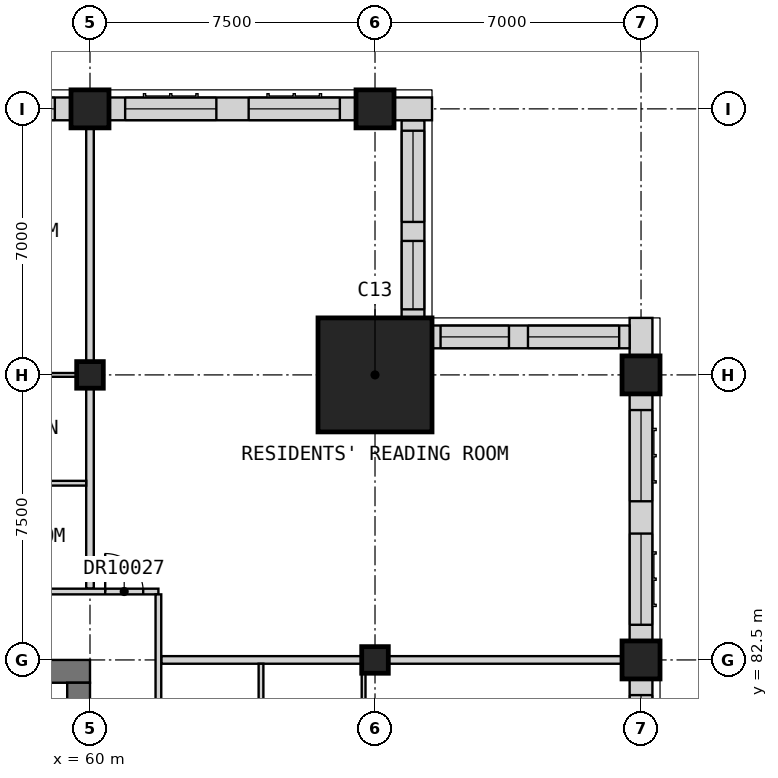
"""IFC4 building model, lengths in metres.
Left out: names, types, materials, properties, quantities, classifications, styles, units other than length and angle.
Written with IfcOpenShell. Run it as: python <this file> out.ifc"""

import sys

from ifc_helpers import new_model, si_unit, direction, frame, frame_2d, origin, origin_2d, place, context, subcontext, project, spatial, rectangle, extrude, element, fill, save


model = new_model("IFC4")
c1 = context("Model", 3, precision=1e-05, world=origin(), true_north=direction((0.0, 1.0)))
c2 = subcontext(c1, "Body", "Model", "MODEL_VIEW")
j1 = project(units=[si_unit("LENGTHUNIT", "METRE"), si_unit("PLANEANGLEUNIT", "RADIAN")], contexts=[c1])
p1 = place(None, origin())
s1 = spatial("IfcSite", under=j1, at=p1, CompositionType="ELEMENT")
p2 = place(p1, origin())
s2 = spatial("IfcBuilding", under=s1, at=p2, CompositionType="ELEMENT")
p3 = place(p2, frame((0.0, 0.0, 283.7)))
s3 = spatial("IfcBuildingStorey", under=s2, at=p3, CompositionType="ELEMENT", Elevation=283.7)
p4 = place(p3, frame((60.0, 90.0, 0.0), z_axis=(0.0, 0.0, 1.0), x_axis=(1.0, 0.0, 0.0)))
e1 = element("IfcColumn", 1, at=p4, inside=s3, PredefinedType="COLUMN", context=c2, shape_type="SweptSolid", body=[
    extrude(rectangle(XDim=0.7, YDim=0.7, at=origin_2d()), origin(), (0.0, 0.0, 1.0), 3.5),
])
p5 = place(p3, frame((60.0, 97.0, 0.0), z_axis=(0.0, 0.0, 1.0), x_axis=(1.0, 0.0, 0.0)))
e2 = element("IfcColumn", 2, at=p5, inside=s3, PredefinedType="COLUMN", context=c2, shape_type="SweptSolid", body=[
    extrude(rectangle(XDim=1.0, YDim=1.0, at=origin_2d()), origin(), (0.0, 0.0, 1.0), 3.5),
])
p6 = place(p3, frame((67.5, 82.5, 0.0), z_axis=(0.0, 0.0, 1.0), x_axis=(1.0, 0.0, 0.0)))
e3 = element("IfcColumn", 3, at=p6, inside=s3, PredefinedType="COLUMN", context=c2, shape_type="SweptSolid", body=[
    extrude(rectangle(XDim=0.7, YDim=0.7, at=origin_2d()), origin(), (0.0, 0.0, 1.0), 3.5),
])
for number, where, z_axis, x_axis in (
    (4, (67.5, 97.0, 0.0), (0.0, 0.0, 1.0), (1.0, 0.0, 0.0)),
    (5, (74.5, 82.5, 0.0), (0.0, 0.0, 1.0), (1.0, 0.0, 0.0)),
    (6, (74.5, 90.0, 0.0), (0.0, 0.0, 1.0), (1.0, 0.0, 0.0)),
):
    element("IfcColumn", number, at=place(p3, frame(where, z_axis=z_axis, x_axis=x_axis)), inside=s3, PredefinedType="COLUMN", context=c2, shape_type="SweptSolid", body=[
        extrude(rectangle(XDim=1.0, YDim=1.0, at=origin_2d()), origin(), (0.0, 0.0, 1.0), 3.5),
    ])
p7 = place(p3, frame((67.5, 90.0, 0.0), z_axis=(0.0, 0.0, 1.0), x_axis=(1.0, 0.0, 0.0)))
e7 = element("IfcColumn", 7, at=p7, inside=s3, PredefinedType="COLUMN", context=c2, shape_type="SweptSolid", body=[
    extrude(rectangle(XDim=3.0, YDim=3.0, at=origin_2d()), origin(), (0.0, 0.0, 1.0), 3.5),
])
p8 = place(p3, frame((30.0, 82.2, 0.0), z_axis=(0.0, 0.0, 1.0), x_axis=(1.0, 0.0, 0.0)))
e8 = element("IfcWall", 8, at=p8, inside=s3, PredefinedType="SHEAR", context=c2, shape_type="SweptSolid", body=[
    extrude(rectangle(XDim=30.0, YDim=0.6, at=frame_2d((15.0, 0.0))), origin(), (0.0, 0.0, 1.0), 3.5),
])
p9 = place(p3, frame((59.7, 60.6, 0.0), z_axis=(0.0, 0.0, 1.0), x_axis=(0.0, 1.0, 0.0)))
e9 = element("IfcWall", 9, at=p9, inside=s3, PredefinedType="SHEAR", context=c2, shape_type="SweptSolid", body=[
    extrude(rectangle(XDim=21.3, YDim=0.6, at=frame_2d((10.65, 0.0))), origin(), (0.0, 0.0, 1.0), 3.5),
])
p10 = place(p9, frame((14.9, 0.0, 0.0)))
e10 = element("IfcOpeningElement", 10, at=p10, cuts=e9, PredefinedType="OPENING", context=c2, shape_type="SweptSolid", body=[
    extrude(rectangle(XDim=1.8, YDim=2.1, at=frame_2d((0.9, 1.05))), frame((0.0, 0.31, 0.0), z_axis=(0.0, -1.0, 0.0), x_axis=(1.0, 0.0, 0.0)), (0.0, 0.0, 1.0), 0.62),
])
p11 = place(p3, frame((74.5, 75.5, 0.0), z_axis=(0.0, 0.0, 1.0), x_axis=(0.0, 1.0, 0.0)))
e11 = element("IfcWall", 11, at=p11, inside=s3, PredefinedType="SOLIDWALL", context=c2, shape_type="SweptSolid", body=[
    extrude(rectangle(XDim=6.5, YDim=0.6, at=frame_2d((3.25, 0.0))), origin(), (0.0, 0.0, 1.0), 2.75),
])
p12 = place(p11, frame((0.425, 0.0, 0.8)))
e12 = element("IfcOpeningElement", 12, at=p12, cuts=e11, PredefinedType="OPENING", context=c2, shape_type="SweptSolid", body=[
    extrude(rectangle(XDim=2.4, YDim=1.8, at=frame_2d((1.2, 0.9))), frame((0.0, 0.31, 0.0), z_axis=(0.0, -1.0, 0.0), x_axis=(1.0, 0.0, 0.0)), (0.0, 0.0, 1.0), 0.62),
])
p13 = place(p11, frame((3.675, 0.0, 0.8)))
e13 = element("IfcOpeningElement", 13, at=p13, cuts=e11, PredefinedType="OPENING", context=c2, shape_type="SweptSolid", body=[
    extrude(rectangle(XDim=2.4, YDim=1.8, at=frame_2d((1.2, 0.9))), frame((0.0, 0.31, 0.0), z_axis=(0.0, -1.0, 0.0), x_axis=(1.0, 0.0, 0.0)), (0.0, 0.0, 1.0), 0.62),
])
p14 = place(p3, frame((74.5, 83.0, 0.0), z_axis=(0.0, 0.0, 1.0), x_axis=(0.0, 1.0, 0.0)))
e14 = element("IfcWall", 14, at=p14, inside=s3, PredefinedType="SOLIDWALL", context=c2, shape_type="SweptSolid", body=[
    extrude(rectangle(XDim=6.5, YDim=0.6, at=frame_2d((3.25, 0.0))), origin(), (0.0, 0.0, 1.0), 2.75),
])
p15 = place(p14, frame((0.425, 0.0, 0.8)))
e15 = element("IfcOpeningElement", 15, at=p15, cuts=e14, PredefinedType="OPENING", context=c2, shape_type="SweptSolid", body=[
    extrude(rectangle(XDim=2.4, YDim=1.8, at=frame_2d((1.2, 0.9))), frame((0.0, 0.31, 0.0), z_axis=(0.0, -1.0, 0.0), x_axis=(1.0, 0.0, 0.0)), (0.0, 0.0, 1.0), 0.62),
])
p16 = place(p14, frame((3.675, 0.0, 0.8)))
e16 = element("IfcOpeningElement", 16, at=p16, cuts=e14, PredefinedType="OPENING", context=c2, shape_type="SweptSolid", body=[
    extrude(rectangle(XDim=2.4, YDim=1.8, at=frame_2d((1.2, 0.9))), frame((0.0, 0.31, 0.0), z_axis=(0.0, -1.0, 0.0), x_axis=(1.0, 0.0, 0.0)), (0.0, 0.0, 1.0), 0.62),
])
p17 = place(p3, frame((74.5, 90.5, 0.0), z_axis=(0.0, 0.0, 1.0), x_axis=(0.0, 1.0, 0.0)))
e17 = element("IfcWall", 17, at=p17, inside=s3, PredefinedType="SOLIDWALL", context=c2, shape_type="SweptSolid", body=[
    extrude(rectangle(XDim=1.0, YDim=0.6, at=frame_2d((0.5, 0.0))), origin(), (0.0, 0.0, 1.0), 3.2),
])
p18 = place(p3, frame((74.2, 91.0, 0.0), z_axis=(0.0, 0.0, 1.0), x_axis=(-1.0, 0.0, 0.0)))
e18 = element("IfcWall", 18, at=p18, inside=s3, PredefinedType="SOLIDWALL", context=c2, shape_type="SweptSolid", body=[
    extrude(rectangle(XDim=5.2, YDim=0.6, at=frame_2d((2.6, 0.0))), origin(), (0.0, 0.0, 1.0), 3.2),
])
p19 = place(p18, frame((3.175, 0.0, 0.8)))
e19 = element("IfcOpeningElement", 19, at=p19, cuts=e18, PredefinedType="OPENING", context=c2, shape_type="SweptSolid", body=[
    extrude(rectangle(XDim=1.8, YDim=1.8, at=frame_2d((0.9, 0.9))), frame((0.0, 0.31, 0.0), z_axis=(0.0, -1.0, 0.0), x_axis=(1.0, 0.0, 0.0)), (0.0, 0.0, 1.0), 0.62),
])
p20 = place(p18, frame((0.275, 0.0, 0.8)))
e20 = element("IfcOpeningElement", 20, at=p20, cuts=e18, PredefinedType="OPENING", context=c2, shape_type="SweptSolid", body=[
    extrude(rectangle(XDim=2.4, YDim=1.8, at=frame_2d((1.2, 0.9))), frame((0.0, 0.31, 0.0), z_axis=(0.0, -1.0, 0.0), x_axis=(1.0, 0.0, 0.0)), (0.0, 0.0, 1.0), 0.62),
])
p21 = place(p3, frame((68.5, 91.5, 0.0), z_axis=(0.0, 0.0, 1.0), x_axis=(0.0, 1.0, 0.0)))
e21 = element("IfcWall", 21, at=p21, inside=s3, PredefinedType="SOLIDWALL", context=c2, shape_type="SweptSolid", body=[
    extrude(rectangle(XDim=5.2, YDim=0.6, at=frame_2d((2.6, 0.0))), origin(), (0.0, 0.0, 1.0), 3.2),
])
p22 = place(p21, frame((0.225, 0.0, 0.8)))
e22 = element("IfcOpeningElement", 22, at=p22, cuts=e21, PredefinedType="OPENING", context=c2, shape_type="SweptSolid", body=[
    extrude(rectangle(XDim=1.8, YDim=1.8, at=frame_2d((0.9, 0.9))), frame((0.0, 0.31, 0.0), z_axis=(0.0, -1.0, 0.0), x_axis=(1.0, 0.0, 0.0)), (0.0, 0.0, 1.0), 0.62),
])
p23 = place(p21, frame((2.525, 0.0, 0.8)))
e23 = element("IfcOpeningElement", 23, at=p23, cuts=e21, PredefinedType="OPENING", context=c2, shape_type="SweptSolid", body=[
    extrude(rectangle(XDim=2.4, YDim=1.8, at=frame_2d((1.2, 0.9))), frame((0.0, 0.31, 0.0), z_axis=(0.0, -1.0, 0.0), x_axis=(1.0, 0.0, 0.0)), (0.0, 0.0, 1.0), 0.62),
])
p24 = place(p3, frame((69.0, 97.0, 0.0), z_axis=(0.0, 0.0, 1.0), x_axis=(-1.0, 0.0, 0.0)))
e24 = element("IfcWall", 24, at=p24, inside=s3, PredefinedType="SOLIDWALL", context=c2, shape_type="SweptSolid", body=[
    extrude(rectangle(XDim=1.0, YDim=0.6, at=frame_2d((0.5, 0.0))), origin(), (0.0, 0.0, 1.0), 3.2),
])
p25 = place(p3, frame((67.0, 97.0, 0.0), z_axis=(0.0, 0.0, 1.0), x_axis=(-1.0, 0.0, 0.0)))
e25 = element("IfcWall", 25, at=p25, inside=s3, PredefinedType="SOLIDWALL", context=c2, shape_type="SweptSolid", body=[
    extrude(rectangle(XDim=6.5, YDim=0.6, at=frame_2d((3.25, 0.0))), origin(), (0.0, 0.0, 1.0), 2.75),
])
p26 = place(p25, frame((3.675, 0.0, 0.8)))
e26 = element("IfcOpeningElement", 26, at=p26, cuts=e25, PredefinedType="OPENING", context=c2, shape_type="SweptSolid", body=[
    extrude(rectangle(XDim=2.4, YDim=1.8, at=frame_2d((1.2, 0.9))), frame((0.0, 0.31, 0.0), z_axis=(0.0, -1.0, 0.0), x_axis=(1.0, 0.0, 0.0)), (0.0, 0.0, 1.0), 0.62),
])
p27 = place(p25, frame((0.425, 0.0, 0.8)))
e27 = element("IfcOpeningElement", 27, at=p27, cuts=e25, PredefinedType="OPENING", context=c2, shape_type="SweptSolid", body=[
    extrude(rectangle(XDim=2.4, YDim=1.8, at=frame_2d((1.2, 0.9))), frame((0.0, 0.31, 0.0), z_axis=(0.0, -1.0, 0.0), x_axis=(1.0, 0.0, 0.0)), (0.0, 0.0, 1.0), 0.62),
])
p28 = place(p3, frame((59.5, 97.0, 0.0), z_axis=(0.0, 0.0, 1.0), x_axis=(-1.0, 0.0, 0.0)))
e28 = element("IfcWall", 28, at=p28, inside=s3, PredefinedType="SOLIDWALL", context=c2, shape_type="SweptSolid", body=[
    extrude(rectangle(XDim=6.5, YDim=0.6, at=frame_2d((3.25, 0.0))), origin(), (0.0, 0.0, 1.0), 2.75),
])
p29 = place(p28, frame((3.675, 0.0, 0.8)))
e29 = element("IfcOpeningElement", 29, at=p29, cuts=e28, PredefinedType="OPENING", context=c2, shape_type="SweptSolid", body=[
    extrude(rectangle(XDim=2.4, YDim=1.8, at=frame_2d((1.2, 0.9))), frame((0.0, 0.31, 0.0), z_axis=(0.0, -1.0, 0.0), x_axis=(1.0, 0.0, 0.0)), (0.0, 0.0, 1.0), 0.62),
])
p30 = place(p28, frame((0.425, 0.0, 0.8)))
e30 = element("IfcOpeningElement", 30, at=p30, cuts=e28, PredefinedType="OPENING", context=c2, shape_type="SweptSolid", body=[
    extrude(rectangle(XDim=2.4, YDim=1.8, at=frame_2d((1.2, 0.9))), frame((0.0, 0.31, 0.0), z_axis=(0.0, -1.0, 0.0), x_axis=(1.0, 0.0, 0.0)), (0.0, 0.0, 1.0), 0.62),
])
for number, where, z_axis, x_axis in (
    (31, (61.875, 82.5, 0.0), (0.0, 0.0, 1.0), (1.0, 0.0, 0.0)),
    (32, (60.0, 84.375, 0.0), (0.0, 0.0, 1.0), (0.0, 1.0, 0.0)),
):
    element("IfcWall", number, at=place(p3, frame(where, z_axis=z_axis, x_axis=x_axis)), inside=s3, PredefinedType="PARTITIONING", context=c2, shape_type="SweptSolid", body=[
        extrude(rectangle(XDim=13.125, YDim=0.2, at=frame_2d((6.562, 0.0))), origin(), (0.0, 0.0, 1.0), 3.2),
    ])
p31 = place(p3, frame((33.75, 84.3, 0.0), z_axis=(0.0, 0.0, 1.0), x_axis=(1.0, 0.0, 0.0)))
e33 = element("IfcWall", 33, at=p31, inside=s3, PredefinedType="PARTITIONING", context=c2, shape_type="SweptSolid", body=[
    extrude(rectangle(XDim=28.05, YDim=0.15, at=frame_2d((14.025, 0.0))), origin(), (0.0, 0.0, 1.0), 3.2),
])
p32 = place(p31, frame((5.125, 0.0, 0.0)))
e34 = element("IfcOpeningElement", 34, at=p32, cuts=e33, PredefinedType="OPENING", context=c2, shape_type="SweptSolid", body=[
    extrude(rectangle(XDim=1.0, YDim=2.1, at=frame_2d((0.5, 1.05))), frame((0.0, 0.085, 0.0), z_axis=(0.0, -1.0, 0.0), x_axis=(1.0, 0.0, 0.0)), (0.0, 0.0, 1.0), 0.17),
])
p33 = place(p31, frame((12.675, 0.0, 0.0)))
e35 = element("IfcOpeningElement", 35, at=p33, cuts=e33, PredefinedType="OPENING", context=c2, shape_type="SweptSolid", body=[
    extrude(rectangle(XDim=0.9, YDim=2.1, at=frame_2d((0.45, 1.05))), frame((0.0, 0.085, 0.0), z_axis=(0.0, -1.0, 0.0), x_axis=(1.0, 0.0, 0.0)), (0.0, 0.0, 1.0), 0.17),
])
p34 = place(p31, frame((20.175, 0.0, 0.0)))
e36 = element("IfcOpeningElement", 36, at=p34, cuts=e33, PredefinedType="OPENING", context=c2, shape_type="SweptSolid", body=[
    extrude(rectangle(XDim=0.9, YDim=2.1, at=frame_2d((0.45, 1.05))), frame((0.0, 0.085, 0.0), z_axis=(0.0, -1.0, 0.0), x_axis=(1.0, 0.0, 0.0)), (0.0, 0.0, 1.0), 0.17),
])
p35 = place(p31, frame((26.65, 0.0, 0.0)))
e37 = element("IfcOpeningElement", 37, at=p35, cuts=e33, PredefinedType="OPENING", context=c2, shape_type="SweptSolid", body=[
    extrude(rectangle(XDim=1.0, YDim=2.1, at=frame_2d((0.5, 1.05))), frame((0.0, 0.085, 0.0), z_axis=(0.0, -1.0, 0.0), x_axis=(1.0, 0.0, 0.0)), (0.0, 0.0, 1.0), 0.17),
])
p36 = place(p3, frame((61.8, 58.275, 0.0), z_axis=(0.0, 0.0, 1.0), x_axis=(0.0, 1.0, 0.0)))
e38 = element("IfcWall", 38, at=p36, inside=s3, PredefinedType="PARTITIONING", context=c2, shape_type="SweptSolid", body=[
    extrude(rectangle(XDim=25.95, YDim=0.15, at=frame_2d((12.975, 0.0))), origin(), (0.0, 0.0, 1.0), 3.2),
])
p37 = place(p36, frame((6.9, 0.0, 0.0)))
e39 = element("IfcOpeningElement", 39, at=p37, cuts=e38, PredefinedType="OPENING", context=c2, shape_type="SweptSolid", body=[
    extrude(rectangle(XDim=0.9, YDim=2.1, at=frame_2d((0.45, 1.05))), frame((0.0, 0.085, 0.0), z_axis=(0.0, -1.0, 0.0), x_axis=(1.0, 0.0, 0.0)), (0.0, 0.0, 1.0), 0.17),
])
p38 = place(p36, frame((18.15, 0.0, 0.0)))
e40 = element("IfcOpeningElement", 40, at=p38, cuts=e38, PredefinedType="OPENING", context=c2, shape_type="SweptSolid", body=[
    extrude(rectangle(XDim=0.9, YDim=2.1, at=frame_2d((0.45, 1.05))), frame((0.0, 0.085, 0.0), z_axis=(0.0, -1.0, 0.0), x_axis=(1.0, 0.0, 0.0)), (0.0, 0.0, 1.0), 0.17),
])
p39 = place(p3, frame((45.1, 90.0, 0.0), z_axis=(0.0, 0.0, 1.0), x_axis=(1.0, 0.0, 0.0)))
e41 = element("IfcWall", 41, at=p39, inside=s3, PredefinedType="PARTITIONING", context=c2, shape_type="SweptSolid", body=[
    extrude(rectangle(XDim=14.8, YDim=0.1, at=frame_2d((7.4, 0.0))), origin(), (0.0, 0.0, 1.0), 3.2),
])
p40 = place(p39, frame((1.325, 0.0, 0.0)))
e42 = element("IfcOpeningElement", 42, at=p40, cuts=e41, PredefinedType="OPENING", context=c2, shape_type="SweptSolid", body=[
    extrude(rectangle(XDim=0.9, YDim=2.1, at=frame_2d((0.45, 1.05))), frame((0.0, 0.06, 0.0), z_axis=(0.0, -1.0, 0.0), x_axis=(1.0, 0.0, 0.0)), (0.0, 0.0, 1.0), 0.12),
])
p41 = place(p39, frame((8.825, 0.0, 0.0)))
e43 = element("IfcOpeningElement", 43, at=p41, cuts=e41, PredefinedType="OPENING", context=c2, shape_type="SweptSolid", body=[
    extrude(rectangle(XDim=0.9, YDim=2.1, at=frame_2d((0.45, 1.05))), frame((0.0, 0.06, 0.0), z_axis=(0.0, -1.0, 0.0), x_axis=(1.0, 0.0, 0.0)), (0.0, 0.0, 1.0), 0.12),
])
p42 = place(p3, frame((67.2, 60.1, 0.0), z_axis=(0.0, 0.0, 1.0), x_axis=(0.0, 1.0, 0.0)))
e44 = element("IfcWall", 44, at=p42, inside=s3, PredefinedType="PARTITIONING", context=c2, shape_type="SweptSolid", body=[
    extrude(rectangle(XDim=22.3, YDim=0.1, at=frame_2d((11.15, 0.0))), origin(), (0.0, 0.0, 1.0), 3.2),
])
p43 = place(p42, frame((1.325, 0.0, 0.0)))
e45 = element("IfcOpeningElement", 45, at=p43, cuts=e44, PredefinedType="OPENING", context=c2, shape_type="SweptSolid", body=[
    extrude(rectangle(XDim=0.9, YDim=2.1, at=frame_2d((0.45, 1.05))), frame((0.0, 0.06, 0.0), z_axis=(0.0, -1.0, 0.0), x_axis=(1.0, 0.0, 0.0)), (0.0, 0.0, 1.0), 0.12),
])
p44 = place(p42, frame((5.075, 0.0, 0.0)))
e46 = element("IfcOpeningElement", 46, at=p44, cuts=e44, PredefinedType="OPENING", context=c2, shape_type="SweptSolid", body=[
    extrude(rectangle(XDim=0.9, YDim=2.1, at=frame_2d((0.45, 1.05))), frame((0.0, 0.06, 0.0), z_axis=(0.0, -1.0, 0.0), x_axis=(1.0, 0.0, 0.0)), (0.0, 0.0, 1.0), 0.12),
])
p45 = place(p42, frame((12.575, 0.0, 0.0)))
e47 = element("IfcOpeningElement", 47, at=p45, cuts=e44, PredefinedType="OPENING", context=c2, shape_type="SweptSolid", body=[
    extrude(rectangle(XDim=0.9, YDim=2.1, at=frame_2d((0.45, 1.05))), frame((0.0, 0.06, 0.0), z_axis=(0.0, -1.0, 0.0), x_axis=(1.0, 0.0, 0.0)), (0.0, 0.0, 1.0), 0.12),
])
p46 = place(p42, frame((16.325, 0.0, 0.0)))
e48 = element("IfcOpeningElement", 48, at=p46, cuts=e44, PredefinedType="OPENING", context=c2, shape_type="SweptSolid", body=[
    extrude(rectangle(XDim=0.9, YDim=2.1, at=frame_2d((0.45, 1.05))), frame((0.0, 0.06, 0.0), z_axis=(0.0, -1.0, 0.0), x_axis=(1.0, 0.0, 0.0)), (0.0, 0.0, 1.0), 0.12),
])
p47 = place(p3, frame((56.25, 87.15, 0.0), z_axis=(0.0, 0.0, 1.0), x_axis=(1.0, 0.0, 0.0)))
e49 = element("IfcWall", 49, at=p47, inside=s3, PredefinedType="PARTITIONING", context=c2, shape_type="SweptSolid", body=[
    extrude(rectangle(XDim=3.65, YDim=0.125, at=frame_2d((1.825, 0.0))), origin(), (0.0, 0.0, 1.0), 3.2),
])
p48 = place(p3, frame((64.5, 78.812, 0.0), z_axis=(0.0, 0.0, 1.0), x_axis=(0.0, 1.0, 0.0)))
e50 = element("IfcWall", 50, at=p48, inside=s3, PredefinedType="PARTITIONING", context=c2, shape_type="SweptSolid", body=[
    extrude(rectangle(XDim=3.587, YDim=0.125, at=frame_2d((1.794, 0.0))), origin(), (0.0, 0.0, 1.0), 3.2),
])
p49 = place(p13, origin())
e51 = element("IfcWindow", 51, at=p49, inside=s3, PartitioningType="SINGLE_PANEL", PredefinedType="WINDOW", context=c2, shape_type="SweptSolid", body=[
    extrude(rectangle(XDim=2.4, YDim=1.8, at=frame_2d((1.2, 0.9))), frame((0.0, -0.07, 0.0), z_axis=(0.0, -1.0, 0.0), x_axis=(1.0, 0.0, 0.0)), (0.0, 0.0, 1.0), 0.06),
])
fill(e13, e51)
p50 = place(p15, origin())
e52 = element("IfcWindow", 52, at=p50, inside=s3, PartitioningType="SINGLE_PANEL", PredefinedType="WINDOW", context=c2, shape_type="SweptSolid", body=[
    extrude(rectangle(XDim=2.4, YDim=1.8, at=frame_2d((1.2, 0.9))), frame((0.0, -0.07, 0.0), z_axis=(0.0, -1.0, 0.0), x_axis=(1.0, 0.0, 0.0)), (0.0, 0.0, 1.0), 0.06),
])
fill(e15, e52)
p51 = place(p16, origin())
e53 = element("IfcWindow", 53, at=p51, inside=s3, PartitioningType="SINGLE_PANEL", PredefinedType="WINDOW", context=c2, shape_type="SweptSolid", body=[
    extrude(rectangle(XDim=2.4, YDim=1.8, at=frame_2d((1.2, 0.9))), frame((0.0, -0.07, 0.0), z_axis=(0.0, -1.0, 0.0), x_axis=(1.0, 0.0, 0.0)), (0.0, 0.0, 1.0), 0.06),
])
fill(e16, e53)
p52 = place(p19, origin())
e54 = element("IfcWindow", 54, at=p52, inside=s3, PartitioningType="SINGLE_PANEL", PredefinedType="WINDOW", context=c2, shape_type="SweptSolid", body=[
    extrude(rectangle(XDim=1.8, YDim=1.8, at=frame_2d((0.9, 0.9))), frame((0.0, -0.07, 0.0), z_axis=(0.0, -1.0, 0.0), x_axis=(1.0, 0.0, 0.0)), (0.0, 0.0, 1.0), 0.06),
])
fill(e19, e54)
p53 = place(p20, origin())
e55 = element("IfcWindow", 55, at=p53, inside=s3, PartitioningType="SINGLE_PANEL", PredefinedType="WINDOW", context=c2, shape_type="SweptSolid", body=[
    extrude(rectangle(XDim=2.4, YDim=1.8, at=frame_2d((1.2, 0.9))), frame((0.0, -0.07, 0.0), z_axis=(0.0, -1.0, 0.0), x_axis=(1.0, 0.0, 0.0)), (0.0, 0.0, 1.0), 0.06),
])
fill(e20, e55)
p54 = place(p22, origin())
e56 = element("IfcWindow", 56, at=p54, inside=s3, PartitioningType="SINGLE_PANEL", PredefinedType="WINDOW", context=c2, shape_type="SweptSolid", body=[
    extrude(rectangle(XDim=1.8, YDim=1.8, at=frame_2d((0.9, 0.9))), frame((0.0, -0.07, 0.0), z_axis=(0.0, -1.0, 0.0), x_axis=(1.0, 0.0, 0.0)), (0.0, 0.0, 1.0), 0.06),
])
fill(e22, e56)
p55 = place(p23, origin())
e57 = element("IfcWindow", 57, at=p55, inside=s3, PartitioningType="SINGLE_PANEL", PredefinedType="WINDOW", context=c2, shape_type="SweptSolid", body=[
    extrude(rectangle(XDim=2.4, YDim=1.8, at=frame_2d((1.2, 0.9))), frame((0.0, -0.07, 0.0), z_axis=(0.0, -1.0, 0.0), x_axis=(1.0, 0.0, 0.0)), (0.0, 0.0, 1.0), 0.06),
])
fill(e23, e57)
p56 = place(p26, origin())
e58 = element("IfcWindow", 58, at=p56, inside=s3, PartitioningType="SINGLE_PANEL", PredefinedType="WINDOW", context=c2, shape_type="SweptSolid", body=[
    extrude(rectangle(XDim=2.4, YDim=1.8, at=frame_2d((1.2, 0.9))), frame((0.0, -0.07, 0.0), z_axis=(0.0, -1.0, 0.0), x_axis=(1.0, 0.0, 0.0)), (0.0, 0.0, 1.0), 0.06),
])
fill(e26, e58)
p57 = place(p27, origin())
e59 = element("IfcWindow", 59, at=p57, inside=s3, PartitioningType="SINGLE_PANEL", PredefinedType="WINDOW", context=c2, shape_type="SweptSolid", body=[
    extrude(rectangle(XDim=2.4, YDim=1.8, at=frame_2d((1.2, 0.9))), frame((0.0, -0.07, 0.0), z_axis=(0.0, -1.0, 0.0), x_axis=(1.0, 0.0, 0.0)), (0.0, 0.0, 1.0), 0.06),
])
fill(e27, e59)
p58 = place(p30, origin())
e60 = element("IfcWindow", 60, at=p58, inside=s3, PartitioningType="SINGLE_PANEL", PredefinedType="WINDOW", context=c2, shape_type="SweptSolid", body=[
    extrude(rectangle(XDim=2.4, YDim=1.8, at=frame_2d((1.2, 0.9))), frame((0.0, -0.07, 0.0), z_axis=(0.0, -1.0, 0.0), x_axis=(1.0, 0.0, 0.0)), (0.0, 0.0, 1.0), 0.06),
])
fill(e30, e60)
p59 = place(p35, origin())
e61 = element("IfcDoor", 61, at=p59, inside=s3, OperationType="SINGLE_SWING_LEFT", PredefinedType="DOOR", context=c2, shape_type="SweptSolid", body=[
    extrude(rectangle(XDim=1.0, YDim=2.1, at=frame_2d((0.5, 1.05))), frame((0.0, 0.025, 0.0), z_axis=(0.0, -1.0, 0.0), x_axis=(1.0, 0.0, 0.0)), (0.0, 0.0, 1.0), 0.05),
])
fill(e37, e61)
save(model, sys.argv[1])
